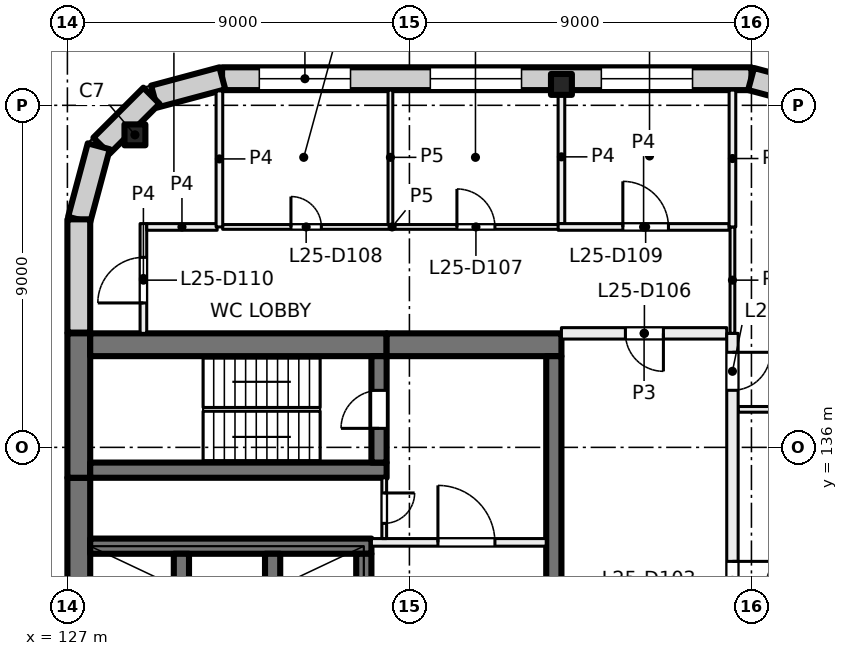
"""IFC4 building model, lengths in metres.
Left out: names, types, materials, properties, quantities, classifications, styles, units other than length and angle.
Written with IfcOpenShell. Run it as: python <this file> out.ifc"""

import sys

from ifc_helpers import new_model, si_unit, direction, frame, frame_2d, origin, origin_2d, place, context, subcontext, project, spatial, rectangle, extrude, element, fill, save


model = new_model("IFC4")
c1 = context("Model", 3, precision=1e-05, world=origin(), true_north=direction((0.0, 1.0)))
c2 = subcontext(c1, "Body", "Model", "MODEL_VIEW")
j1 = project(units=[si_unit("LENGTHUNIT", "METRE"), si_unit("PLANEANGLEUNIT", "RADIAN")], contexts=[c1])
p1 = place(None, origin())
s1 = spatial("IfcSite", under=j1, at=p1, CompositionType="ELEMENT")
p2 = place(p1, origin())
s2 = spatial("IfcBuilding", under=s1, at=p2, CompositionType="ELEMENT")
p3 = place(p2, frame((0.0, 0.0, 109.0)))
s3 = spatial("IfcBuildingStorey", under=s2, at=p3, CompositionType="ELEMENT", Elevation=109.0)
for number, where, z_axis, x_axis in (
    (1, (128.777, 144.223, 0.0), (0.0, 0.0, 1.0), (1.0, 0.0, 0.0)),
    (2, (140.0, 145.55, 0.0), (0.0, 0.0, 1.0), (1.0, 0.0, 0.0)),
):
    element("IfcColumn", number, at=place(p3, frame(where, z_axis=z_axis, x_axis=x_axis)), inside=s3, PredefinedType="COLUMN", context=c2, shape_type="SweptSolid", body=[
        extrude(rectangle(XDim=0.55, YDim=0.55, at=origin_2d()), origin(), (0.0, 0.0, 1.0), 4.0),
    ])
p4 = place(p3, frame((127.3, 120.8, 0.0), z_axis=(0.0, 0.0, 1.0), x_axis=(0.0, 1.0, 0.0)))
e3 = element("IfcWall", 3, at=p4, inside=s3, PredefinedType="SHEAR", context=c2, shape_type="SweptSolid", body=[
    extrude(rectangle(XDim=14.4, YDim=0.6, at=frame_2d((7.2, 0.0))), origin(), (0.0, 0.0, 1.0), 4.0),
])
p5 = place(p4, frame((6.3, 0.0, 0.0)))
e4 = element("IfcOpeningElement", 4, at=p5, cuts=e3, PredefinedType="OPENING", context=c2, shape_type="SweptSolid", body=[
    extrude(rectangle(XDim=1.8, YDim=2.1, at=frame_2d((0.9, 1.05))), frame((0.0, 0.31, 0.0), z_axis=(0.0, -1.0, 0.0), x_axis=(1.0, 0.0, 0.0)), (0.0, 0.0, 1.0), 0.62),
])
p6 = place(p3, frame((127.3, 135.2, 0.0), z_axis=(0.0, 0.0, 1.0), x_axis=(0.0, 1.0, 0.0)))
e5 = element("IfcWall", 5, at=p6, inside=s3, PredefinedType="SHEAR", context=c2, shape_type="SweptSolid", body=[
    extrude(rectangle(XDim=3.8, YDim=0.6, at=frame_2d((1.9, 0.0))), origin(), (0.0, 0.0, 1.0), 4.0),
])
p7 = place(p3, frame((127.6, 138.7, 0.0), z_axis=(0.0, 0.0, 1.0), x_axis=(1.0, 0.0, 0.0)))
e6 = element("IfcWall", 6, at=p7, inside=s3, PredefinedType="SHEAR", context=c2, shape_type="SweptSolid", body=[
    extrude(rectangle(XDim=7.8, YDim=0.6, at=frame_2d((3.9, 0.0))), origin(), (0.0, 0.0, 1.0), 4.0),
])
p8 = place(p3, frame((135.4, 138.7, 0.0), z_axis=(0.0, 0.0, 1.0), x_axis=(1.0, 0.0, 0.0)))
e7 = element("IfcWall", 7, at=p8, inside=s3, PredefinedType="SHEAR", context=c2, shape_type="SweptSolid", body=[
    extrude(rectangle(XDim=4.6, YDim=0.6, at=frame_2d((2.3, 0.0))), origin(), (0.0, 0.0, 1.0), 4.0),
])
p9 = place(p3, frame((127.6, 135.4, 0.0), z_axis=(0.0, 0.0, 1.0), x_axis=(1.0, 0.0, 0.0)))
e8 = element("IfcWall", 8, at=p9, inside=s3, PredefinedType="SHEAR", context=c2, shape_type="SweptSolid", body=[
    extrude(rectangle(XDim=7.8, YDim=0.4, at=frame_2d((3.9, 0.0))), origin(), (0.0, 0.0, 1.0), 4.0),
])
p10 = place(p3, frame((135.2, 135.6, 0.0), z_axis=(0.0, 0.0, 1.0), x_axis=(0.0, 1.0, 0.0)))
e9 = element("IfcWall", 9, at=p10, inside=s3, PredefinedType="SHEAR", context=c2, shape_type="SweptSolid", body=[
    extrude(rectangle(XDim=2.8, YDim=0.4, at=frame_2d((1.4, 0.0))), origin(), (0.0, 0.0, 1.0), 4.0),
])
p11 = place(p10, frame((0.9, 0.0, 0.0)))
e10 = element("IfcOpeningElement", 10, at=p11, cuts=e9, PredefinedType="OPENING", context=c2, shape_type="SweptSolid", body=[
    extrude(rectangle(XDim=1.0, YDim=2.1, at=frame_2d((0.5, 1.05))), frame((0.0, 0.21, 0.0), z_axis=(0.0, -1.0, 0.0), x_axis=(1.0, 0.0, 0.0)), (0.0, 0.0, 1.0), 0.42),
])
p12 = place(p3, frame((127.6, 133.4, 0.0), z_axis=(0.0, 0.0, 1.0), x_axis=(1.0, 0.0, 0.0)))
e11 = element("IfcWall", 11, at=p12, inside=s3, PredefinedType="SHEAR", context=c2, shape_type="SweptSolid", body=[
    extrude(rectangle(XDim=7.4, YDim=0.4, at=frame_2d((3.7, 0.0))), origin(), (0.0, 0.0, 1.0), 4.0),
])
for number, where, z_axis, x_axis in (
    (12, (130.0, 130.2, 0.0), (0.0, 0.0, 1.0), (0.0, 1.0, 0.0)),
    (13, (132.4, 130.2, 0.0), (0.0, 0.0, 1.0), (0.0, 1.0, 0.0)),
):
    element("IfcWall", number, at=place(p3, frame(where, z_axis=z_axis, x_axis=x_axis)), inside=s3, PredefinedType="SHEAR", context=c2, shape_type="SweptSolid", body=[
        extrude(rectangle(XDim=3.0, YDim=0.4, at=frame_2d((1.5, 0.0))), origin(), (0.0, 0.0, 1.0), 4.0),
    ])
p13 = place(p3, frame((134.8, 130.2, 0.0), z_axis=(0.0, 0.0, 1.0), x_axis=(0.0, 1.0, 0.0)))
e14 = element("IfcWall", 14, at=p13, inside=s3, PredefinedType="SHEAR", context=c2, shape_type="SweptSolid", body=[
    extrude(rectangle(XDim=3.0, YDim=0.4, at=frame_2d((1.5, 0.0))), origin(), (0.0, 0.0, 1.0), 4.0),
])
p14 = place(p13, frame((0.95, 0.0, 0.0)))
e15 = element("IfcOpeningElement", 15, at=p14, cuts=e14, PredefinedType="OPENING", context=c2, shape_type="SweptSolid", body=[
    extrude(rectangle(XDim=1.1, YDim=2.1, at=frame_2d((0.55, 1.05))), frame((0.0, 0.21, 0.0), z_axis=(0.0, -1.0, 0.0), x_axis=(1.0, 0.0, 0.0)), (0.0, 0.0, 1.0), 0.42),
])
p15 = place(p3, frame((139.8, 129.8, 0.0), z_axis=(0.0, 0.0, 1.0), x_axis=(0.0, 1.0, 0.0)))
e16 = element("IfcWall", 16, at=p15, inside=s3, PredefinedType="SHEAR", context=c2, shape_type="SweptSolid", body=[
    extrude(rectangle(XDim=8.6, YDim=0.4, at=frame_2d((4.3, 0.0))), origin(), (0.0, 0.0, 1.0), 4.0),
])
p16 = place(p3, frame((131.07, 145.7, 0.0), z_axis=(0.0, 0.0, 1.0), x_axis=(1.0, 0.0, 0.0)))
e17 = element("IfcWall", 17, at=p16, inside=s3, PredefinedType="SOLIDWALL", context=c2, shape_type="SweptSolid", body=[
    extrude(rectangle(XDim=13.93, YDim=0.6, at=frame_2d((6.965, 0.0))), origin(), (0.0, 0.0, 1.0), 3.625),
])
p17 = place(p16, frame((0.98, 0.0, 0.9)))
e18 = element("IfcOpeningElement", 18, at=p17, cuts=e17, PredefinedType="OPENING", context=c2, shape_type="SweptSolid", body=[
    extrude(rectangle(XDim=2.4, YDim=2.4, at=frame_2d((1.2, 1.2))), frame((0.0, 0.31, 0.0), z_axis=(0.0, -1.0, 0.0), x_axis=(1.0, 0.0, 0.0)), (0.0, 0.0, 1.0), 0.62),
])
p18 = place(p16, frame((5.48, 0.0, 0.9)))
e19 = element("IfcOpeningElement", 19, at=p18, cuts=e17, PredefinedType="OPENING", context=c2, shape_type="SweptSolid", body=[
    extrude(rectangle(XDim=2.4, YDim=2.4, at=frame_2d((1.2, 1.2))), frame((0.0, 0.31, 0.0), z_axis=(0.0, -1.0, 0.0), x_axis=(1.0, 0.0, 0.0)), (0.0, 0.0, 1.0), 0.62),
])
p19 = place(p16, frame((9.98, 0.0, 0.9)))
e20 = element("IfcOpeningElement", 20, at=p19, cuts=e17, PredefinedType="OPENING", context=c2, shape_type="SweptSolid", body=[
    extrude(rectangle(XDim=2.4, YDim=2.4, at=frame_2d((1.2, 1.2))), frame((0.0, 0.31, 0.0), z_axis=(0.0, -1.0, 0.0), x_axis=(1.0, 0.0, 0.0)), (0.0, 0.0, 1.0), 0.62),
])
for number, where, z_axis, x_axis in (
    (21, (129.281, 145.229, 0.0), (0.0, 0.0, 1.0), (0.966, 0.259, 0.0)),
    (22, (127.896, 143.936, 0.0), (0.0, 0.0, 1.0), (0.707, 0.707, 0.0)),
):
    element("IfcWall", number, at=place(p3, frame(where, z_axis=z_axis, x_axis=x_axis)), inside=s3, PredefinedType="SOLIDWALL", context=c2, shape_type="SweptSolid", body=[
        extrude(rectangle(XDim=1.861, YDim=0.6, at=frame_2d((0.93, 0.0))), origin(), (0.0, 0.0, 1.0), 3.625),
    ])
p20 = place(p3, frame((127.308, 141.99, 0.0), z_axis=(0.0, 0.0, 1.0), x_axis=(0.258839784042, 0.965920269068, 0.0)))
e23 = element("IfcWall", 23, at=p20, inside=s3, PredefinedType="SOLIDWALL", context=c2, shape_type="SweptSolid", body=[
    extrude(rectangle(XDim=2.0, YDim=0.6, at=frame_2d((1.0, 0.0))), origin(), (0.0, 0.0, 1.0), 3.625),
])
p21 = place(p3, frame((127.3, 139.02, 0.0), z_axis=(0.0, 0.0, 1.0), x_axis=(0.0, 1.0, 0.0)))
e24 = element("IfcWall", 24, at=p21, inside=s3, PredefinedType="SOLIDWALL", context=c2, shape_type="SweptSolid", body=[
    extrude(rectangle(XDim=2.98, YDim=0.6, at=frame_2d((1.49, 0.0))), origin(), (0.0, 0.0, 1.0), 3.625),
])
p22 = place(p3, frame((144.99, 145.692, 0.0), z_axis=(0.0, 0.0, 1.0), x_axis=(0.965920269068, -0.258839784042, 0.0)))
e25 = element("IfcWall", 25, at=p22, inside=s3, PredefinedType="SOLIDWALL", context=c2, shape_type="SweptSolid", body=[
    extrude(rectangle(XDim=2.0, YDim=0.6, at=frame_2d((1.0, 0.0))), origin(), (0.0, 0.0, 1.0), 3.625),
])
p23 = place(p3, frame((135.0, 133.5, 0.0), z_axis=(0.0, 0.0, 1.0), x_axis=(1.0, 0.0, 0.0)))
e26 = element("IfcWall", 26, at=p23, inside=s3, PredefinedType="PARTITIONING", context=c2, shape_type="SweptSolid", body=[
    extrude(rectangle(XDim=4.6, YDim=0.2, at=frame_2d((2.3, 0.0))), origin(), (0.0, 0.0, 1.0), 3.625),
])
p24 = place(p23, frame((1.75, 0.0, 0.0)))
e27 = element("IfcOpeningElement", 27, at=p24, cuts=e26, PredefinedType="OPENING", context=c2, shape_type="SweptSolid", body=[
    extrude(rectangle(XDim=1.5, YDim=2.1, at=frame_2d((0.75, 1.05))), frame((0.0, 0.11, 0.0), z_axis=(0.0, -1.0, 0.0), x_axis=(1.0, 0.0, 0.0)), (0.0, 0.0, 1.0), 0.22),
])
p25 = place(p3, frame((135.337, 135.2, 0.0), z_axis=(0.0, 0.0, 1.0), x_axis=(0.0, -1.0, 0.0)))
e28 = element("IfcWall", 28, at=p25, inside=s3, PredefinedType="PARTITIONING", context=c2, shape_type="SweptSolid", body=[
    extrude(rectangle(XDim=1.6, YDim=0.125, at=frame_2d((0.8, 0.0))), origin(), (0.0, 0.0, 1.0), 3.625),
])
p26 = place(p25, frame((0.4, 0.0, 0.0)))
e29 = element("IfcOpeningElement", 29, at=p26, cuts=e28, PredefinedType="OPENING", context=c2, shape_type="SweptSolid", body=[
    extrude(rectangle(XDim=0.8, YDim=2.1, at=frame_2d((0.4, 1.05))), frame((0.0, 0.073, 0.0), z_axis=(0.0, -1.0, 0.0), x_axis=(1.0, 0.0, 0.0)), (0.0, 0.0, 1.0), 0.145),
])
p27 = place(p3, frame((129.0, 139.0, 0.0), z_axis=(0.0, 0.0, 1.0), x_axis=(0.0, 1.0, 0.0)))
e30 = element("IfcWall", 30, at=p27, inside=s3, PredefinedType="PARTITIONING", context=c2, shape_type="SweptSolid", body=[
    extrude(rectangle(XDim=2.888, YDim=0.175, at=frame_2d((1.444, 0.0))), origin(), (0.0, 0.0, 1.0), 3.625),
])
p28 = place(p27, frame((0.8, 0.0, 0.0)))
e31 = element("IfcOpeningElement", 31, at=p28, cuts=e30, PredefinedType="OPENING", context=c2, shape_type="SweptSolid", body=[
    extrude(rectangle(XDim=1.2, YDim=2.1, at=frame_2d((0.6, 1.05))), frame((0.0, 0.097, 0.0), z_axis=(0.0, -1.0, 0.0), x_axis=(1.0, 0.0, 0.0)), (0.0, 0.0, 1.0), 0.195),
])
p29 = place(p3, frame((129.088, 141.8, 0.0), z_axis=(0.0, 0.0, 1.0), x_axis=(1.0, 0.0, 0.0)))
e32 = element("IfcWall", 32, at=p29, inside=s3, PredefinedType="PARTITIONING", context=c2, shape_type="SweptSolid", body=[
    extrude(rectangle(XDim=1.853, YDim=0.175, at=frame_2d((0.927, 0.0))), origin(), (0.0, 0.0, 1.0), 3.625),
])
p30 = place(p3, frame((131.085, 141.8, 0.0), z_axis=(0.0, 0.0, 1.0), x_axis=(1.0, 0.0, 0.0)))
e33 = element("IfcWall", 33, at=p30, inside=s3, PredefinedType="PARTITIONING", context=c2, shape_type="SweptSolid", body=[
    extrude(rectangle(XDim=8.918, YDim=0.125, at=frame_2d((4.459, 0.0))), origin(), (0.0, 0.0, 1.0), 3.625),
])
p31 = place(p30, frame((6.165, 0.0, 0.0)))
e34 = element("IfcOpeningElement", 34, at=p31, cuts=e33, PredefinedType="OPENING", context=c2, shape_type="SweptSolid", body=[
    extrude(rectangle(XDim=1.0, YDim=2.1, at=frame_2d((0.5, 1.05))), frame((0.0, 0.073, 0.0), z_axis=(0.0, -1.0, 0.0), x_axis=(1.0, 0.0, 0.0)), (0.0, 0.0, 1.0), 0.145),
])
p32 = place(p30, frame((1.798, 0.0, 0.0)))
e35 = element("IfcOpeningElement", 35, at=p32, cuts=e33, PredefinedType="OPENING", context=c2, shape_type="SweptSolid", body=[
    extrude(rectangle(XDim=0.8, YDim=2.1, at=frame_2d((0.4, 1.05))), frame((0.0, 0.073, 0.0), z_axis=(0.0, -1.0, 0.0), x_axis=(1.0, 0.0, 0.0)), (0.0, 0.0, 1.0), 0.145),
])
p33 = place(p3, frame((131.0, 145.379, 0.0), z_axis=(0.0, 0.0, 1.0), x_axis=(0.0, -1.0, 0.0)))
e36 = element("IfcWall", 36, at=p33, inside=s3, PredefinedType="PARTITIONING", context=c2, shape_type="SweptSolid", body=[
    extrude(rectangle(XDim=3.579, YDim=0.175, at=frame_2d((1.79, 0.0))), origin(), (0.0, 0.0, 1.0), 3.625),
])
p34 = place(p3, frame((135.5, 141.862, 0.0), z_axis=(0.0, 0.0, 1.0), x_axis=(0.0, 1.0, 0.0)))
e37 = element("IfcWall", 37, at=p34, inside=s3, PredefinedType="PARTITIONING", context=c2, shape_type="SweptSolid", body=[
    extrude(rectangle(XDim=3.538, YDim=0.125, at=frame_2d((1.769, 0.0))), origin(), (0.0, 0.0, 1.0), 3.625),
])
p35 = place(p3, frame((144.35, 139.0, 0.0), z_axis=(0.0, 0.0, 1.0), x_axis=(-1.0, 0.0, 0.0)))
e38 = element("IfcWall", 38, at=p35, inside=s3, PredefinedType="PARTITIONING", context=c2, shape_type="SweptSolid", body=[
    extrude(rectangle(XDim=4.35, YDim=0.3, at=frame_2d((2.175, 0.0))), origin(), (0.0, 0.0, 1.0), 3.625),
])
p36 = place(p35, frame((1.667, 0.0, 0.0)))
e39 = element("IfcOpeningElement", 39, at=p36, cuts=e38, PredefinedType="OPENING", context=c2, shape_type="SweptSolid", body=[
    extrude(rectangle(XDim=1.0, YDim=2.1, at=frame_2d((0.5, 1.05))), frame((0.0, 0.16, 0.0), z_axis=(0.0, -1.0, 0.0), x_axis=(1.0, 0.0, 0.0)), (0.0, 0.0, 1.0), 0.32),
])
p37 = place(p3, frame((140.0, 141.888, 0.0), z_axis=(0.0, 0.0, 1.0), x_axis=(0.0, 1.0, 0.0)))
e40 = element("IfcWall", 40, at=p37, inside=s3, PredefinedType="PARTITIONING", context=c2, shape_type="SweptSolid", body=[
    extrude(rectangle(XDim=3.512, YDim=0.175, at=frame_2d((1.756, 0.0))), origin(), (0.0, 0.0, 1.0), 3.625),
])
p38 = place(p3, frame((139.912, 141.8, 0.0), z_axis=(0.0, 0.0, 1.0), x_axis=(1.0, 0.0, 0.0)))
e41 = element("IfcWall", 41, at=p38, inside=s3, PredefinedType="PARTITIONING", context=c2, shape_type="SweptSolid", body=[
    extrude(rectangle(XDim=4.5, YDim=0.175, at=frame_2d((2.25, 0.0))), origin(), (0.0, 0.0, 1.0), 3.625),
])
p39 = place(p38, frame((1.704, 0.0, 0.0)))
e42 = element("IfcOpeningElement", 42, at=p39, cuts=e41, PredefinedType="OPENING", context=c2, shape_type="SweptSolid", body=[
    extrude(rectangle(XDim=1.2, YDim=2.1, at=frame_2d((0.6, 1.05))), frame((0.0, 0.097, 0.0), z_axis=(0.0, -1.0, 0.0), x_axis=(1.0, 0.0, 0.0)), (0.0, 0.0, 1.0), 0.195),
])
p40 = place(p3, frame((144.65, 137.0, 0.0), z_axis=(0.0, 0.0, 1.0), x_axis=(1.0, 0.0, 0.0)))
e43 = element("IfcWall", 43, at=p40, inside=s3, PredefinedType="PARTITIONING", context=c2, shape_type="SweptSolid", body=[
    extrude(rectangle(XDim=3.75, YDim=0.15, at=frame_2d((1.875, 0.0))), origin(), (0.0, 0.0, 1.0), 3.625),
])
p41 = place(p3, frame((144.5, 139.0, 0.0), z_axis=(0.0, 0.0, 1.0), x_axis=(0.0, -1.0, 0.0)))
e44 = element("IfcWall", 44, at=p41, inside=s3, PredefinedType="PARTITIONING", context=c2, shape_type="SweptSolid", body=[
    extrude(rectangle(XDim=22.0, YDim=0.3, at=frame_2d((11.0, 0.0))), origin(), (0.0, 0.0, 1.0), 3.625),
])
p42 = place(p41, frame((20.501, 0.0, 0.0)))
e45 = element("IfcOpeningElement", 45, at=p42, cuts=e44, PredefinedType="OPENING", context=c2, shape_type="SweptSolid", body=[
    extrude(rectangle(XDim=1.0, YDim=2.1, at=frame_2d((0.5, 1.05))), frame((0.0, 0.16, 0.0), z_axis=(0.0, -1.0, 0.0), x_axis=(1.0, 0.0, 0.0)), (0.0, 0.0, 1.0), 0.32),
])
p43 = place(p41, frame((15.0, 0.0, 0.0)))
e46 = element("IfcOpeningElement", 46, at=p43, cuts=e44, PredefinedType="OPENING", context=c2, shape_type="SweptSolid", body=[
    extrude(rectangle(XDim=1.0, YDim=2.1, at=frame_2d((0.5, 1.05))), frame((0.0, 0.16, 0.0), z_axis=(0.0, -1.0, 0.0), x_axis=(1.0, 0.0, 0.0)), (0.0, 0.0, 1.0), 0.32),
])
p44 = place(p41, frame((6.0, 0.0, 0.0)))
e47 = element("IfcOpeningElement", 47, at=p44, cuts=e44, PredefinedType="OPENING", context=c2, shape_type="SweptSolid", body=[
    extrude(rectangle(XDim=1.0, YDim=2.1, at=frame_2d((0.5, 1.05))), frame((0.0, 0.16, 0.0), z_axis=(0.0, -1.0, 0.0), x_axis=(1.0, 0.0, 0.0)), (0.0, 0.0, 1.0), 0.32),
])
p45 = place(p41, frame((0.499, 0.0, 0.0)))
e48 = element("IfcOpeningElement", 48, at=p45, cuts=e44, PredefinedType="OPENING", context=c2, shape_type="SweptSolid", body=[
    extrude(rectangle(XDim=1.0, YDim=2.1, at=frame_2d((0.5, 1.05))), frame((0.0, 0.16, 0.0), z_axis=(0.0, -1.0, 0.0), x_axis=(1.0, 0.0, 0.0)), (0.0, 0.0, 1.0), 0.32),
])
p46 = place(p3, frame((144.5, 141.8, 0.0), z_axis=(0.0, 0.0, 1.0), x_axis=(0.0, -1.0, 0.0)))
e49 = element("IfcWall", 49, at=p46, inside=s3, PredefinedType="PARTITIONING", context=c2, shape_type="SweptSolid", body=[
    extrude(rectangle(XDim=2.8, YDim=0.125, at=frame_2d((1.4, 0.0))), origin(), (0.0, 0.0, 1.0), 3.625),
])
p47 = place(p3, frame((144.5, 141.8, 0.0), z_axis=(0.0, 0.0, 1.0), x_axis=(0.0, 1.0, 0.0)))
e50 = element("IfcWall", 50, at=p47, inside=s3, PredefinedType="PARTITIONING", context=c2, shape_type="SweptSolid", body=[
    extrude(rectangle(XDim=3.6, YDim=0.175, at=frame_2d((1.8, 0.0))), origin(), (0.0, 0.0, 1.0), 3.625),
])
p48 = place(p17, origin())
e51 = element("IfcWindow", 51, at=p48, inside=s3, PartitioningType="SINGLE_PANEL", PredefinedType="WINDOW", context=c2, shape_type="SweptSolid", body=[
    extrude(rectangle(XDim=2.4, YDim=2.4, at=frame_2d((1.2, 1.2))), frame((0.0, 0.03, 0.0), z_axis=(0.0, -1.0, 0.0), x_axis=(1.0, 0.0, 0.0)), (0.0, 0.0, 1.0), 0.06),
])
fill(e18, e51)
p49 = place(p18, origin())
e52 = element("IfcWindow", 52, at=p49, inside=s3, PartitioningType="SINGLE_PANEL", PredefinedType="WINDOW", context=c2, shape_type="SweptSolid", body=[
    extrude(rectangle(XDim=2.4, YDim=2.4, at=frame_2d((1.2, 1.2))), frame((0.0, 0.03, 0.0), z_axis=(0.0, -1.0, 0.0), x_axis=(1.0, 0.0, 0.0)), (0.0, 0.0, 1.0), 0.06),
])
fill(e19, e52)
p50 = place(p19, origin())
e53 = element("IfcWindow", 53, at=p50, inside=s3, PartitioningType="SINGLE_PANEL", PredefinedType="WINDOW", context=c2, shape_type="SweptSolid", body=[
    extrude(rectangle(XDim=2.4, YDim=2.4, at=frame_2d((1.2, 1.2))), frame((0.0, 0.03, 0.0), z_axis=(0.0, -1.0, 0.0), x_axis=(1.0, 0.0, 0.0)), (0.0, 0.0, 1.0), 0.06),
])
fill(e20, e53)
p51 = place(p24, origin())
e54 = element("IfcDoor", 54, at=p51, inside=s3, OperationType="DOUBLE_DOOR_SINGLE_SWING", PredefinedType="DOOR", context=c2, shape_type="SweptSolid", body=[
    extrude(rectangle(XDim=1.5, YDim=2.1, at=frame_2d((0.75, 1.05))), frame((0.0, 0.025, 0.0), z_axis=(0.0, -1.0, 0.0), x_axis=(1.0, 0.0, 0.0)), (0.0, 0.0, 1.0), 0.05),
])
fill(e27, e54)
p52 = place(p11, origin())
e55 = element("IfcDoor", 55, at=p52, inside=s3, OperationType="SINGLE_SWING_LEFT", PredefinedType="DOOR", context=c2, shape_type="SweptSolid", body=[
    extrude(rectangle(XDim=1.0, YDim=2.1, at=frame_2d((0.5, 1.05))), frame((0.0, 0.025, 0.0), z_axis=(0.0, -1.0, 0.0), x_axis=(1.0, 0.0, 0.0)), (0.0, 0.0, 1.0), 0.05),
])
fill(e10, e55)
p53 = place(p26, origin())
e56 = element("IfcDoor", 56, at=p53, inside=s3, OperationType="SINGLE_SWING_RIGHT", PredefinedType="DOOR", context=c2, shape_type="SweptSolid", body=[
    extrude(rectangle(XDim=0.8, YDim=2.1, at=frame_2d((0.4, 1.05))), frame((0.0, 0.025, 0.0), z_axis=(0.0, -1.0, 0.0), x_axis=(1.0, 0.0, 0.0)), (0.0, 0.0, 1.0), 0.05),
])
fill(e29, e56)
p54 = place(p44, origin())
e57 = element("IfcDoor", 57, at=p54, inside=s3, OperationType="SINGLE_SWING_LEFT", PredefinedType="DOOR", context=c2, shape_type="SweptSolid", body=[
    extrude(rectangle(XDim=1.0, YDim=2.1, at=frame_2d((0.5, 1.05))), frame((0.0, 0.025, 0.0), z_axis=(0.0, -1.0, 0.0), x_axis=(1.0, 0.0, 0.0)), (0.0, 0.0, 1.0), 0.05),
])
fill(e47, e57)
p55 = place(p45, origin())
e58 = element("IfcDoor", 58, at=p55, inside=s3, OperationType="SINGLE_SWING_LEFT", PredefinedType="DOOR", context=c2, shape_type="SweptSolid", body=[
    extrude(rectangle(XDim=1.0, YDim=2.1, at=frame_2d((0.5, 1.05))), frame((0.0, 0.025, 0.0), z_axis=(0.0, -1.0, 0.0), x_axis=(1.0, 0.0, 0.0)), (0.0, 0.0, 1.0), 0.05),
])
fill(e48, e58)
p56 = place(p36, origin())
e59 = element("IfcDoor", 59, at=p56, inside=s3, OperationType="SINGLE_SWING_LEFT", PredefinedType="DOOR", context=c2, shape_type="SweptSolid", body=[
    extrude(rectangle(XDim=1.0, YDim=2.1, at=frame_2d((0.5, 1.05))), frame((0.0, 0.025, 0.0), z_axis=(0.0, -1.0, 0.0), x_axis=(1.0, 0.0, 0.0)), (0.0, 0.0, 1.0), 0.05),
])
fill(e39, e59)
p57 = place(p31, origin())
e60 = element("IfcDoor", 60, at=p57, inside=s3, OperationType="SINGLE_SWING_RIGHT", PredefinedType="DOOR", context=c2, shape_type="SweptSolid", body=[
    extrude(rectangle(XDim=1.0, YDim=2.1, at=frame_2d((0.5, 1.05))), frame((0.0, 0.025, 0.0), z_axis=(0.0, -1.0, 0.0), x_axis=(1.0, 0.0, 0.0)), (0.0, 0.0, 1.0), 0.05),
])
fill(e34, e60)
p58 = place(p32, origin())
e61 = element("IfcDoor", 61, at=p58, inside=s3, OperationType="SINGLE_SWING_LEFT", PredefinedType="DOOR", context=c2, shape_type="SweptSolid", body=[
    extrude(rectangle(XDim=0.8, YDim=2.1, at=frame_2d((0.4, 1.05))), frame((0.0, 0.025, 0.0), z_axis=(0.0, -1.0, 0.0), x_axis=(1.0, 0.0, 0.0)), (0.0, 0.0, 1.0), 0.05),
])
fill(e35, e61)
p59 = place(p39, origin())
e62 = element("IfcDoor", 62, at=p59, inside=s3, OperationType="DOUBLE_DOOR_SINGLE_SWING", PredefinedType="DOOR", context=c2, shape_type="SweptSolid", body=[
    extrude(rectangle(XDim=1.2, YDim=2.1, at=frame_2d((0.6, 1.05))), frame((0.0, 0.025, 0.0), z_axis=(0.0, -1.0, 0.0), x_axis=(1.0, 0.0, 0.0)), (0.0, 0.0, 1.0), 0.05),
])
fill(e42, e62)
p60 = place(p28, origin())
e63 = element("IfcDoor", 63, at=p60, inside=s3, OperationType="DOUBLE_DOOR_SINGLE_SWING", PredefinedType="DOOR", context=c2, shape_type="SweptSolid", body=[
    extrude(rectangle(XDim=1.2, YDim=2.1, at=frame_2d((0.6, 1.05))), frame((0.0, 0.025, 0.0), z_axis=(0.0, -1.0, 0.0), x_axis=(1.0, 0.0, 0.0)), (0.0, 0.0, 1.0), 0.05),
])
fill(e31, e63)
save(model, sys.argv[1])
